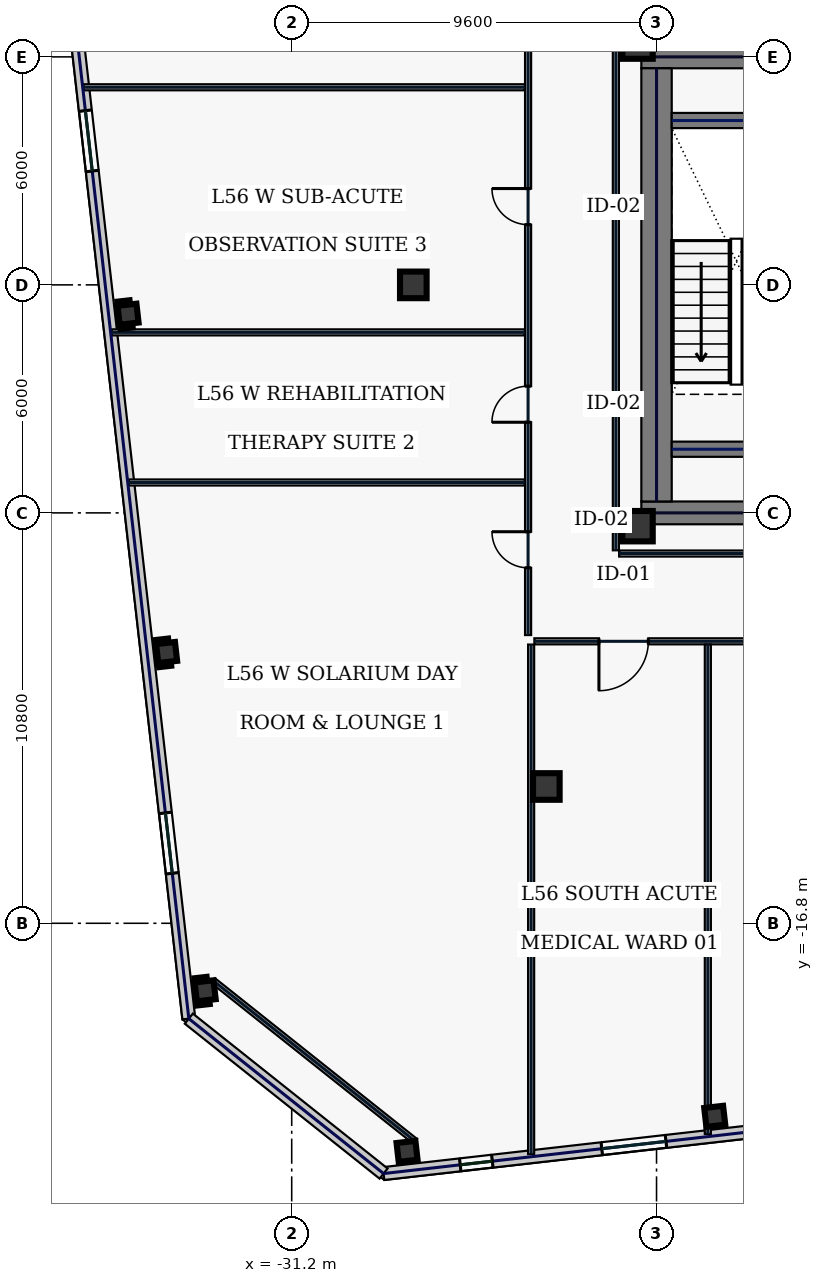
"""IFC4 building model, lengths in metres.
Left out: names, types, materials, properties, quantities, classifications, styles, units other than length and angle.
Written with IfcOpenShell. Run it as: python <this file> out.ifc"""

import sys

from ifc_helpers import new_model, si_unit, direction, frame, frame_2d, origin, origin_2d, place, context, subcontext, project, spatial, rectangle, hollow_rectangle, extrude, element, fill, save


model = new_model("IFC4")
c1 = context("Model", 3, precision=1e-05, world=origin(), true_north=direction((0.0, 1.0)))
c2 = subcontext(c1, "Body", "Model", "MODEL_VIEW")
j1 = project(units=[si_unit("LENGTHUNIT", "METRE"), si_unit("PLANEANGLEUNIT", "RADIAN")], contexts=[c1])
p1 = place(None, origin())
s1 = spatial("IfcSite", under=j1, at=p1, CompositionType="ELEMENT")
p2 = place(p1, origin())
s2 = spatial("IfcBuilding", under=s1, at=p2, CompositionType="ELEMENT")
p3 = place(p2, frame((0.0, 0.0, 243.0)))
s3 = spatial("IfcBuildingStorey", under=s2, at=p3, CompositionType="ELEMENT", Elevation=243.0)
for number, where, z_axis, x_axis in (
    (1, (-22.0, 6.0, 0.0), (0.0, 0.0, 1.0), (1.0, 0.0, 0.0)),
    (2, (-22.0, -6.0, 0.0), (0.0, 0.0, 1.0), (1.0, 0.0, 0.0)),
):
    element("IfcWall", number, at=place(p3, frame(where, z_axis=z_axis, x_axis=x_axis)), inside=s3, PredefinedType="SHEAR", context=c2, shape_type="SweptSolid", body=[
        extrude(rectangle(XDim=11.5, YDim=0.6, at=frame_2d((5.75, 0.0))), origin(), (0.0, 0.0, 1.0), 3.74),
    ])
p4 = place(p3, frame((-21.6, -5.7, 0.0), z_axis=(0.0, 0.0, 1.0), x_axis=(0.0, 1.0, 0.0)))
e3 = element("IfcWall", 3, at=p4, inside=s3, PredefinedType="SHEAR", context=c2, shape_type="SweptSolid", body=[
    extrude(rectangle(XDim=11.4, YDim=0.8, at=frame_2d((5.7, 0.0))), origin(), (0.0, 0.0, 1.0), 3.74),
])
for number, where, z_axis, x_axis in (
    (4, (-21.2, -4.325, 0.0), (0.0, 0.0, 1.0), (1.0, 0.0, 0.0)),
    (5, (-21.2, 4.325, 0.0), (0.0, 0.0, 1.0), (1.0, 0.0, 0.0)),
):
    element("IfcWall", number, at=place(p3, frame(where, z_axis=z_axis, x_axis=x_axis)), inside=s3, PredefinedType="SHEAR", context=c2, shape_type="SweptSolid", body=[
        extrude(rectangle(XDim=3.4, YDim=0.4, at=frame_2d((1.7, 0.0))), origin(), (0.0, 0.0, 1.0), 3.74),
    ])
for number, where, z_axis, x_axis in (
    (6, (-22.1, -6.35, 0.0), (0.0, 0.0, 1.0), (1.0, 0.0, 0.0)),
    (7, (-22.1, 6.35, 0.0), (0.0, 0.0, 1.0), (1.0, 0.0, 0.0)),
):
    element("IfcColumn", number, at=place(p3, frame(where, z_axis=z_axis, x_axis=x_axis)), inside=s3, PredefinedType="COLUMN", context=c2, shape_type="SweptSolid", body=[
        extrude(hollow_rectangle(XDim=0.8, YDim=0.8, WallThickness=0.036, at=origin_2d()), origin(), (0.0, 0.0, 1.0), 3.74),
    ])
for number, where, z_axis, x_axis in (
    (8, (-24.5, -13.2, 0.0), (0.0, 0.0, 1.0), (1.0, 0.0, 0.0)),
    (9, (-28.0, 0.0, 0.0), (0.0, 0.0, 1.0), (1.0, 0.0, 0.0)),
):
    element("IfcColumn", number, at=place(p3, frame(where, z_axis=z_axis, x_axis=x_axis)), inside=s3, PredefinedType="COLUMN", context=c2, shape_type="SweptSolid", body=[
        extrude(hollow_rectangle(XDim=0.7, YDim=0.7, WallThickness=0.032, at=origin_2d()), origin(), (0.0, 0.0, 1.0), 3.74),
    ])
for number, where, z_axis, x_axis in (
    (10, (-28.165, -22.802, 0.0), (0.0, 0.0, 1.0), (0.994, 0.113, 0.0)),
    (11, (-20.069, -21.88, 0.0), (0.0, 0.0, 1.0), (0.994, 0.113, 0.0)),
    (12, (-35.506, -0.772, 0.0), (0.0, 0.0, 1.0), (0.994, 0.113, 0.0)),
    (13, (-34.491, -9.674, 0.0), (0.0, 0.0, 1.0), (0.994, 0.113, 0.0)),
    (14, (-33.477, -18.577, 0.0), (0.0, 0.0, 1.0), (0.994, 0.113, 0.0)),
):
    element("IfcColumn", number, at=place(p3, frame(where, z_axis=z_axis, x_axis=x_axis)), inside=s3, PredefinedType="COLUMN", context=c2, shape_type="SweptSolid", body=[
        extrude(hollow_rectangle(XDim=0.5, YDim=0.5, WallThickness=0.025, at=origin_2d()), origin(), (0.0, 0.0, 1.0), 3.74),
    ])
p5 = place(p3, frame((-28.783, -23.386, 0.0), z_axis=(0.0, 0.0, 1.0), x_axis=(0.993572271362, 0.113199565282, 0.0)))
e15 = element("IfcWall", 15, at=p5, inside=s3, PredefinedType="STANDARD", context=c2, shape_type="SweptSolid", body=[
    extrude(rectangle(XDim=18.651, YDim=0.34, at=frame_2d((9.326, 0.0))), origin(), (0.0, 0.0, 1.0), 3.74),
])
p6 = place(p5, frame((2.03, 0.0, 0.88)))
e16 = element("IfcOpeningElement", 16, at=p6, cuts=e15, PredefinedType="OPENING", context=c2, shape_type="SweptSolid", body=[
    extrude(rectangle(XDim=0.85, YDim=1.85, at=frame_2d((0.425, 0.925))), frame((0.0, 0.18, 0.0), z_axis=(0.0, -1.0, 0.0), x_axis=(1.0, 0.0, 0.0)), (0.0, 0.0, 1.0), 0.36),
])
p7 = place(p5, frame((5.779, 0.0, 0.88)))
e17 = element("IfcOpeningElement", 17, at=p7, cuts=e15, PredefinedType="OPENING", context=c2, shape_type="SweptSolid", body=[
    extrude(rectangle(XDim=1.7, YDim=1.95, at=frame_2d((0.85, 0.975))), frame((0.0, 0.18, 0.0), z_axis=(0.0, -1.0, 0.0), x_axis=(1.0, 0.0, 0.0)), (0.0, 0.0, 1.0), 0.36),
])
p8 = place(p5, frame((10.179, 0.0, 0.88)))
e18 = element("IfcOpeningElement", 18, at=p8, cuts=e15, PredefinedType="OPENING", context=c2, shape_type="SweptSolid", body=[
    extrude(rectangle(XDim=1.7, YDim=1.95, at=frame_2d((0.85, 0.975))), frame((0.0, 0.18, 0.0), z_axis=(0.0, -1.0, 0.0), x_axis=(1.0, 0.0, 0.0)), (0.0, 0.0, 1.0), 0.36),
])
p9 = place(p5, frame((13.927, 0.0, 0.88)))
e19 = element("IfcOpeningElement", 19, at=p9, cuts=e15, PredefinedType="OPENING", context=c2, shape_type="SweptSolid", body=[
    extrude(rectangle(XDim=1.7, YDim=1.95, at=frame_2d((0.85, 0.975))), frame((0.0, 0.18, 0.0), z_axis=(0.0, -1.0, 0.0), x_axis=(1.0, 0.0, 0.0)), (0.0, 0.0, 1.0), 0.36),
])
p10 = place(p3, frame((-38.118, 17.651, 0.0), z_axis=(0.0, 0.0, 1.0), x_axis=(0.11320360501, -0.9935718111, 0.0)))
e20 = element("IfcWall", 20, at=p10, inside=s3, PredefinedType="STANDARD", context=c2, shape_type="SweptSolid", body=[
    extrude(rectangle(XDim=37.2, YDim=0.34, at=frame_2d((18.6, 0.0))), origin(), (0.0, 0.0, 1.0), 3.74),
])
p11 = place(p10, frame((3.85, 0.0, 0.58)))
e21 = element("IfcOpeningElement", 21, at=p11, cuts=e20, PredefinedType="OPENING", context=c2, shape_type="SweptSolid", body=[
    extrude(rectangle(XDim=1.6, YDim=2.3, at=frame_2d((0.8, 1.15))), frame((0.0, 0.18, 0.0), z_axis=(0.0, -1.0, 0.0), x_axis=(1.0, 0.0, 0.0)), (0.0, 0.0, 1.0), 0.36),
])
p12 = place(p10, frame((13.15, 0.0, 0.58)))
e22 = element("IfcOpeningElement", 22, at=p12, cuts=e20, PredefinedType="OPENING", context=c2, shape_type="SweptSolid", body=[
    extrude(rectangle(XDim=1.6, YDim=2.3, at=frame_2d((0.8, 1.15))), frame((0.0, 0.18, 0.0), z_axis=(0.0, -1.0, 0.0), x_axis=(1.0, 0.0, 0.0)), (0.0, 0.0, 1.0), 0.36),
])
p13 = place(p10, frame((31.75, 0.0, 0.58)))
e23 = element("IfcOpeningElement", 23, at=p13, cuts=e20, PredefinedType="OPENING", context=c2, shape_type="SweptSolid", body=[
    extrude(rectangle(XDim=1.6, YDim=2.3, at=frame_2d((0.8, 1.15))), frame((0.0, 0.18, 0.0), z_axis=(0.0, -1.0, 0.0), x_axis=(1.0, 0.0, 0.0)), (0.0, 0.0, 1.0), 0.36),
])
p14 = place(p3, frame((-33.907, -19.31, 0.0), z_axis=(0.0, 0.0, 1.0), x_axis=(0.782611787794, -0.622510071892, 0.0)))
e24 = element("IfcWall", 24, at=p14, inside=s3, PredefinedType="STANDARD", context=c2, shape_type="SweptSolid", body=[
    extrude(rectangle(XDim=6.548, YDim=0.34, at=frame_2d((3.274, 0.0))), origin(), (0.0, 0.0, 1.0), 3.74),
])
p15 = place(p3, frame((-33.265, -18.311, 0.0), z_axis=(0.0, 0.0, 1.0), x_axis=(0.782602647064, -0.622521563328, 0.0)))
e25 = element("IfcWall", 25, at=p15, inside=s3, PredefinedType="PARTITIONING", context=c2, shape_type="SweptSolid", body=[
    extrude(rectangle(XDim=6.788, YDim=0.16, at=frame_2d((3.394, 0.0))), origin(), (0.0, 0.0, 1.0), 3.74),
])
p16 = place(p3, frame((-24.98, -9.215, 0.0), z_axis=(0.0, 0.0, 1.0), x_axis=(0.0, 1.0, 0.0)))
e26 = element("IfcWall", 26, at=p16, inside=s3, PredefinedType="PARTITIONING", context=c2, shape_type="SweptSolid", body=[
    extrude(rectangle(XDim=18.63, YDim=0.16, at=frame_2d((9.315, 0.0))), origin(), (0.0, 0.0, 1.0), 3.74),
])
p17 = place(p16, frame((1.769, 0.0, 0.0)))
e27 = element("IfcOpeningElement", 27, at=p17, cuts=e26, PredefinedType="OPENING", context=c2, shape_type="SweptSolid", body=[
    extrude(rectangle(XDim=0.95, YDim=2.2, at=frame_2d((0.475, 1.1))), frame((0.0, 0.09, 0.0), z_axis=(0.0, -1.0, 0.0), x_axis=(1.0, 0.0, 0.0)), (0.0, 0.0, 1.0), 0.18),
])
p18 = place(p16, frame((5.6, 0.0, 0.0)))
e28 = element("IfcOpeningElement", 28, at=p18, cuts=e26, PredefinedType="OPENING", context=c2, shape_type="SweptSolid", body=[
    extrude(rectangle(XDim=0.95, YDim=2.2, at=frame_2d((0.475, 1.1))), frame((0.0, 0.09, 0.0), z_axis=(0.0, -1.0, 0.0), x_axis=(1.0, 0.0, 0.0)), (0.0, 0.0, 1.0), 0.18),
])
p19 = place(p16, frame((10.8, 0.0, 0.0)))
e29 = element("IfcOpeningElement", 29, at=p19, cuts=e26, PredefinedType="OPENING", context=c2, shape_type="SweptSolid", body=[
    extrude(rectangle(XDim=0.95, YDim=2.2, at=frame_2d((0.475, 1.1))), frame((0.0, 0.09, 0.0), z_axis=(0.0, -1.0, 0.0), x_axis=(1.0, 0.0, 0.0)), (0.0, 0.0, 1.0), 0.18),
])
p20 = place(p16, frame((15.981, 0.0, 0.0)))
e30 = element("IfcOpeningElement", 30, at=p20, cuts=e26, PredefinedType="OPENING", context=c2, shape_type="SweptSolid", body=[
    extrude(rectangle(XDim=0.95, YDim=2.2, at=frame_2d((0.475, 1.1))), frame((0.0, 0.09, 0.0), z_axis=(0.0, -1.0, 0.0), x_axis=(1.0, 0.0, 0.0)), (0.0, 0.0, 1.0), 0.18),
])
p21 = place(p3, frame((-15.065, -9.38, 0.0), z_axis=(0.0, 0.0, 1.0), x_axis=(-1.0, 0.0, 0.0)))
e31 = element("IfcWall", 31, at=p21, inside=s3, PredefinedType="PARTITIONING", context=c2, shape_type="SweptSolid", body=[
    extrude(rectangle(XDim=9.75, YDim=0.16, at=frame_2d((4.875, 0.0))), origin(), (0.0, 0.0, 1.0), 3.74),
])
p22 = place(p21, frame((6.751, 0.0, 0.0)))
e32 = element("IfcOpeningElement", 32, at=p22, cuts=e31, PredefinedType="OPENING", context=c2, shape_type="SweptSolid", body=[
    extrude(rectangle(XDim=1.3, YDim=2.2, at=frame_2d((0.65, 1.1))), frame((0.0, 0.09, 0.0), z_axis=(0.0, -1.0, 0.0), x_axis=(1.0, 0.0, 0.0)), (0.0, 0.0, 1.0), 0.18),
])
p23 = place(p21, frame((2.354, 0.0, 0.0)))
e33 = element("IfcOpeningElement", 33, at=p23, cuts=e31, PredefinedType="OPENING", context=c2, shape_type="SweptSolid", body=[
    extrude(rectangle(XDim=1.15, YDim=2.2, at=frame_2d((0.575, 1.1))), frame((0.0, 0.09, 0.0), z_axis=(0.0, -1.0, 0.0), x_axis=(1.0, 0.0, 0.0)), (0.0, 0.0, 1.0), 0.18),
])
p24 = place(p3, frame((-22.67, 7.185, 0.0), z_axis=(0.0, 0.0, 1.0), x_axis=(0.0, -1.0, 0.0)))
e34 = element("IfcWall", 34, at=p24, inside=s3, PredefinedType="PARTITIONING", context=c2, shape_type="SweptSolid", body=[
    extrude(rectangle(XDim=14.17, YDim=0.16, at=frame_2d((7.085, 0.0))), origin(), (0.0, 0.0, 1.0), 3.74),
])
p25 = place(p3, frame((-22.585, -7.07, 0.0), z_axis=(0.0, 0.0, 1.0), x_axis=(1.0, 0.0, 0.0)))
e35 = element("IfcWall", 35, at=p25, inside=s3, PredefinedType="PARTITIONING", context=c2, shape_type="SweptSolid", body=[
    extrude(rectangle(XDim=11.87, YDim=0.16, at=frame_2d((5.935, 0.0))), origin(), (0.0, 0.0, 1.0), 3.74),
])
p26 = place(p3, frame((-24.9, -22.873, 0.0), z_axis=(0.0, 0.0, 1.0), x_axis=(0.0, 1.0, 0.0)))
e36 = element("IfcWall", 36, at=p26, inside=s3, PredefinedType="PARTITIONING", context=c2, shape_type="SweptSolid", body=[
    extrude(rectangle(XDim=13.408, YDim=0.16, at=frame_2d((6.704, 0.0))), origin(), (0.0, 0.0, 1.0), 3.74),
])
p27 = place(p3, frame((-20.25, -22.344, 0.0), z_axis=(0.0, 0.0, 1.0), x_axis=(0.0, 1.0, 0.0)))
e37 = element("IfcWall", 37, at=p27, inside=s3, PredefinedType="PARTITIONING", context=c2, shape_type="SweptSolid", body=[
    extrude(rectangle(XDim=12.878, YDim=0.16, at=frame_2d((6.439, 0.0))), origin(), (0.0, 0.0, 1.0), 3.74),
])
p28 = place(p3, frame((-35.494, -5.2, 0.0), z_axis=(0.0, 0.0, 1.0), x_axis=(1.0, 0.0, 0.0)))
e38 = element("IfcWall", 38, at=p28, inside=s3, PredefinedType="PARTITIONING", context=c2, shape_type="SweptSolid", body=[
    extrude(rectangle(XDim=10.429, YDim=0.16, at=frame_2d((5.215, 0.0))), origin(), (0.0, 0.0, 1.0), 3.74),
])
p29 = place(p3, frame((-35.945, -1.25, 0.0), z_axis=(0.0, 0.0, 1.0), x_axis=(1.0, 0.0, 0.0)))
e39 = element("IfcWall", 39, at=p29, inside=s3, PredefinedType="PARTITIONING", context=c2, shape_type="SweptSolid", body=[
    extrude(rectangle(XDim=10.88, YDim=0.16, at=frame_2d((5.44, 0.0))), origin(), (0.0, 0.0, 1.0), 3.74),
])
p30 = place(p3, frame((-36.679, 5.2, 0.0), z_axis=(0.0, 0.0, 1.0), x_axis=(1.0, 0.0, 0.0)))
e40 = element("IfcWall", 40, at=p30, inside=s3, PredefinedType="PARTITIONING", context=c2, shape_type="SweptSolid", body=[
    extrude(rectangle(XDim=11.615, YDim=0.16, at=frame_2d((5.807, 0.0))), origin(), (0.0, 0.0, 1.0), 3.74),
])
p31 = place(p6, origin())
e41 = element("IfcWindow", 41, at=p31, inside=s3, PartitioningType="SINGLE_PANEL", PredefinedType="WINDOW", context=c2, shape_type="SweptSolid", body=[
    extrude(rectangle(XDim=0.85, YDim=1.85, at=frame_2d((0.425, 0.925))), frame((0.0, 0.03, 0.0), z_axis=(0.0, -1.0, 0.0), x_axis=(1.0, 0.0, 0.0)), (0.0, 0.0, 1.0), 0.06),
])
fill(e16, e41)
p32 = place(p7, origin())
e42 = element("IfcWindow", 42, at=p32, inside=s3, PartitioningType="SINGLE_PANEL", PredefinedType="WINDOW", context=c2, shape_type="SweptSolid", body=[
    extrude(rectangle(XDim=1.7, YDim=1.95, at=frame_2d((0.85, 0.975))), frame((0.0, 0.03, 0.0), z_axis=(0.0, -1.0, 0.0), x_axis=(1.0, 0.0, 0.0)), (0.0, 0.0, 1.0), 0.06),
])
fill(e17, e42)
p33 = place(p12, origin())
e43 = element("IfcWindow", 43, at=p33, inside=s3, PartitioningType="SINGLE_PANEL", PredefinedType="WINDOW", context=c2, shape_type="SweptSolid", body=[
    extrude(rectangle(XDim=1.6, YDim=2.3, at=frame_2d((0.8, 1.15))), frame((0.0, 0.03, 0.0), z_axis=(0.0, -1.0, 0.0), x_axis=(1.0, 0.0, 0.0)), (0.0, 0.0, 1.0), 0.06),
])
fill(e22, e43)
p34 = place(p13, origin())
e44 = element("IfcWindow", 44, at=p34, inside=s3, PartitioningType="SINGLE_PANEL", PredefinedType="WINDOW", context=c2, shape_type="SweptSolid", body=[
    extrude(rectangle(XDim=1.6, YDim=2.3, at=frame_2d((0.8, 1.15))), frame((0.0, 0.03, 0.0), z_axis=(0.0, -1.0, 0.0), x_axis=(1.0, 0.0, 0.0)), (0.0, 0.0, 1.0), 0.06),
])
fill(e23, e44)
p35 = place(p22, origin())
e45 = element("IfcDoor", 45, at=p35, inside=s3, OperationType="SINGLE_SWING_RIGHT", PredefinedType="DOOR", context=c2, shape_type="SweptSolid", body=[
    extrude(rectangle(XDim=1.3, YDim=2.2, at=frame_2d((0.65, 1.1))), frame((0.0, 0.025, 0.0), z_axis=(0.0, -1.0, 0.0), x_axis=(1.0, 0.0, 0.0)), (0.0, 0.0, 1.0), 0.05),
])
fill(e32, e45)
p36 = place(p17, origin())
e46 = element("IfcDoor", 46, at=p36, inside=s3, OperationType="SINGLE_SWING_RIGHT", PredefinedType="DOOR", context=c2, shape_type="SweptSolid", body=[
    extrude(rectangle(XDim=0.95, YDim=2.2, at=frame_2d((0.475, 1.1))), frame((0.0, 0.025, 0.0), z_axis=(0.0, -1.0, 0.0), x_axis=(1.0, 0.0, 0.0)), (0.0, 0.0, 1.0), 0.05),
])
fill(e27, e46)
p37 = place(p18, origin())
e47 = element("IfcDoor", 47, at=p37, inside=s3, OperationType="SINGLE_SWING_LEFT", PredefinedType="DOOR", context=c2, shape_type="SweptSolid", body=[
    extrude(rectangle(XDim=0.95, YDim=2.2, at=frame_2d((0.475, 1.1))), frame((0.0, 0.025, 0.0), z_axis=(0.0, -1.0, 0.0), x_axis=(1.0, 0.0, 0.0)), (0.0, 0.0, 1.0), 0.05),
])
fill(e28, e47)
p38 = place(p19, origin())
e48 = element("IfcDoor", 48, at=p38, inside=s3, OperationType="SINGLE_SWING_RIGHT", PredefinedType="DOOR", context=c2, shape_type="SweptSolid", body=[
    extrude(rectangle(XDim=0.95, YDim=2.2, at=frame_2d((0.475, 1.1))), frame((0.0, 0.025, 0.0), z_axis=(0.0, -1.0, 0.0), x_axis=(1.0, 0.0, 0.0)), (0.0, 0.0, 1.0), 0.05),
])
fill(e29, e48)
save(model, sys.argv[1])
